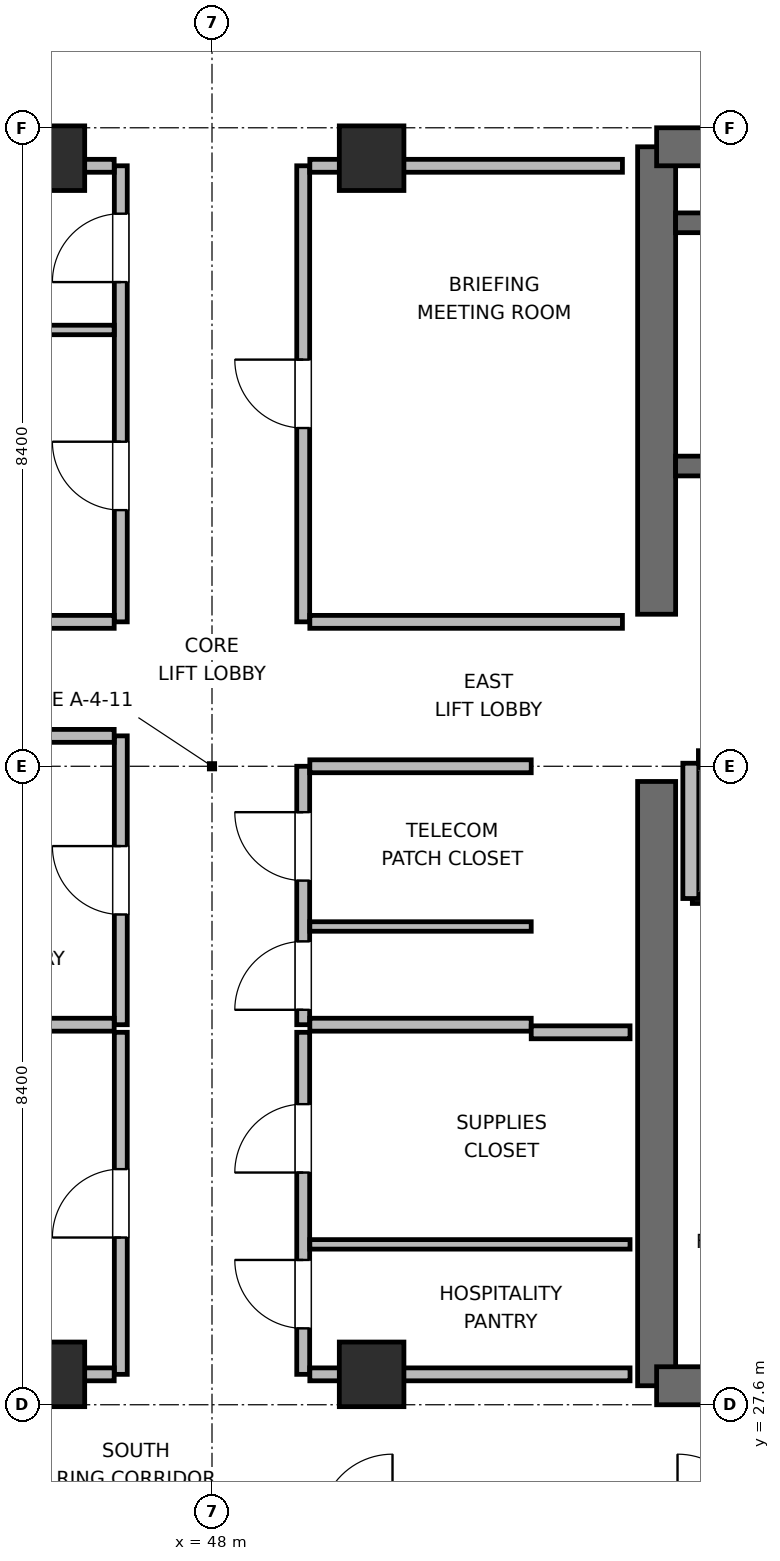
"""IFC4 building model, lengths in metres.
Left out: names, types, materials, properties, quantities, classifications, styles, units other than length and angle.
Written with IfcOpenShell. Run it as: python <this file> out.ifc"""

import sys

from ifc_helpers import new_model, si_unit, direction, frame, frame_2d, origin, origin_2d, place, context, subcontext, project, spatial, rectangle, extrude, element, fill, save


model = new_model("IFC4")
c1 = context("Model", 3, precision=1e-05, world=origin(), true_north=direction((0.0, 1.0)))
c2 = subcontext(c1, "Body", "Model", "MODEL_VIEW")
j1 = project(units=[si_unit("LENGTHUNIT", "METRE"), si_unit("PLANEANGLEUNIT", "RADIAN")], contexts=[c1])
p1 = place(None, origin())
s1 = spatial("IfcSite", under=j1, at=p1, CompositionType="ELEMENT")
p2 = place(p1, origin())
s2 = spatial("IfcBuilding", under=s1, at=p2, CompositionType="ELEMENT")
p3 = place(p2, frame((0.0, 0.0, 314.1)))
s3 = spatial("IfcBuildingStorey", under=s2, at=p3, CompositionType="ELEMENT", Elevation=314.1)
p4 = place(p3, frame((53.85, 27.85, 0.0), z_axis=(0.0, 0.0, 1.0), x_axis=(0.0, 1.0, 0.0)))
e1 = element("IfcWall", 1, at=p4, inside=s3, PredefinedType="SHEAR", context=c2, shape_type="SweptSolid", body=[
    extrude(rectangle(XDim=7.95, YDim=0.5, at=frame_2d((3.975, 0.0))), origin(), (0.0, 0.0, 1.0), 3.9),
])
p5 = place(p3, frame((53.85, 38.0, 0.0), z_axis=(0.0, 0.0, 1.0), x_axis=(0.0, 1.0, 0.0)))
e2 = element("IfcWall", 2, at=p5, inside=s3, PredefinedType="SHEAR", context=c2, shape_type="SweptSolid", body=[
    extrude(rectangle(XDim=6.15, YDim=0.5, at=frame_2d((3.075, 0.0))), origin(), (0.0, 0.0, 1.0), 3.9),
])
p6 = place(p3, frame((53.85, 27.85, 0.0), z_axis=(0.0, 0.0, 1.0), x_axis=(1.0, 0.0, 0.0)))
e3 = element("IfcWall", 3, at=p6, inside=s3, PredefinedType="SHEAR", context=c2, shape_type="SweptSolid", body=[
    extrude(rectangle(XDim=9.5, YDim=0.5, at=frame_2d((4.75, 0.0))), origin(), (0.0, 0.0, 1.0), 3.9),
])
p7 = place(p6, frame((4.025, 0.0, 0.0)))
e4 = element("IfcOpeningElement", 4, at=p7, cuts=e3, PredefinedType="OPENING", context=c2, shape_type="SweptSolid", body=[
    extrude(rectangle(XDim=1.05, YDim=2.04, at=frame_2d((0.525, 1.02))), frame((0.0, 0.26, 0.0), z_axis=(0.0, -1.0, 0.0), x_axis=(1.0, 0.0, 0.0)), (0.0, 0.0, 1.0), 0.52),
])
p8 = place(p3, frame((53.85, 44.15, 0.0), z_axis=(0.0, 0.0, 1.0), x_axis=(1.0, 0.0, 0.0)))
e5 = element("IfcWall", 5, at=p8, inside=s3, PredefinedType="SHEAR", context=c2, shape_type="SweptSolid", body=[
    extrude(rectangle(XDim=9.5, YDim=0.5, at=frame_2d((4.75, 0.0))), origin(), (0.0, 0.0, 1.0), 3.9),
])
p9 = place(p3, frame((54.1, 39.95, 0.0), z_axis=(0.0, 0.0, 1.0), x_axis=(1.0, 0.0, 0.0)))
e6 = element("IfcWall", 6, at=p9, inside=s3, PredefinedType="SHEAR", context=c2, shape_type="SweptSolid", body=[
    extrude(rectangle(XDim=9.0, YDim=0.26, at=frame_2d((4.5, 0.0))), origin(), (0.0, 0.0, 1.0), 3.9),
])
p10 = place(p9, frame((1.1, 0.0, 0.0)))
e7 = element("IfcOpeningElement", 7, at=p10, cuts=e6, PredefinedType="OPENING", context=c2, shape_type="SweptSolid", body=[
    extrude(rectangle(XDim=1.0, YDim=2.04, at=frame_2d((0.5, 1.02))), frame((0.0, 0.14, 0.0), z_axis=(0.0, -1.0, 0.0), x_axis=(1.0, 0.0, 0.0)), (0.0, 0.0, 1.0), 0.28),
])
p11 = place(p3, frame((54.1, 43.15, 0.0), z_axis=(0.0, 0.0, 1.0), x_axis=(1.0, 0.0, 0.0)))
e8 = element("IfcWall", 8, at=p11, inside=s3, PredefinedType="SHEAR", context=c2, shape_type="SweptSolid", body=[
    extrude(rectangle(XDim=9.0, YDim=0.26, at=frame_2d((4.5, 0.0))), origin(), (0.0, 0.0, 1.0), 3.9),
])
for number, where, z_axis, x_axis in (
    (9, (45.9, 28.0, 0.0), (0.0, 0.0, 1.0), (1.0, 0.0, 0.0)),
    (10, (50.1, 28.0, 0.0), (0.0, 0.0, 1.0), (1.0, 0.0, 0.0)),
    (11, (45.9, 44.0, 0.0), (0.0, 0.0, 1.0), (1.0, 0.0, 0.0)),
    (12, (50.1, 44.0, 0.0), (0.0, 0.0, 1.0), (1.0, 0.0, 0.0)),
):
    element("IfcColumn", number, at=place(p3, frame(where, z_axis=z_axis, x_axis=x_axis)), inside=s3, PredefinedType="COLUMN", context=c2, shape_type="SweptSolid", body=[
        extrude(rectangle(XDim=0.85, YDim=0.85, at=origin_2d()), origin(), (0.0, 0.0, 1.0), 3.9),
    ])
p12 = place(p3, frame((54.32, 34.3, 0.0), z_axis=(0.0, 0.0, 1.0), x_axis=(1.0, 0.0, 0.0)))
e13 = element("IfcWall", 13, at=p12, inside=s3, PredefinedType="PARTITIONING", context=c2, shape_type="SweptSolid", body=[
    extrude(rectangle(XDim=3.48, YDim=0.21, at=frame_2d((1.74, 0.0))), origin(), (0.0, 0.0, 1.0), 3.68),
])
p13 = place(p3, frame((54.4, 36.1, 0.0), z_axis=(0.0, 0.0, 1.0), x_axis=(1.0, 0.0, 0.0)))
e14 = element("IfcWall", 14, at=p13, inside=s3, PredefinedType="PARTITIONING", context=c2, shape_type="SweptSolid", body=[
    extrude(rectangle(XDim=2.1, YDim=0.21, at=frame_2d((1.05, 0.0))), origin(), (0.0, 0.0, 1.0), 3.68),
])
p14 = place(p13, frame((0.5, 0.0, 0.0)))
e15 = element("IfcOpeningElement", 15, at=p14, cuts=e14, PredefinedType="OPENING", context=c2, shape_type="SweptSolid", body=[
    extrude(rectangle(XDim=1.1, YDim=2.04, at=frame_2d((0.55, 1.02))), frame((0.0, 0.115, 0.0), z_axis=(0.0, -1.0, 0.0), x_axis=(1.0, 0.0, 0.0)), (0.0, 0.0, 1.0), 0.23),
])
p15 = place(p3, frame((54.3, 34.26, 0.0), z_axis=(0.0, 0.0, 1.0), x_axis=(0.0, 1.0, 0.0)))
e16 = element("IfcWall", 16, at=p15, inside=s3, PredefinedType="PARTITIONING", context=c2, shape_type="SweptSolid", body=[
    extrude(rectangle(XDim=1.78, YDim=0.21, at=frame_2d((0.89, 0.0))), origin(), (0.0, 0.0, 1.0), 3.68),
])
p16 = place(p3, frame((46.8, 32.6, 0.0), z_axis=(0.0, 0.0, 1.0), x_axis=(0.0, 1.0, 0.0)))
e17 = element("IfcWall", 17, at=p16, inside=s3, PredefinedType="PARTITIONING", context=c2, shape_type="SweptSolid", body=[
    extrude(rectangle(XDim=3.8, YDim=0.17, at=frame_2d((1.9, 0.0))), origin(), (0.0, 0.0, 1.0), 3.68),
])
p17 = place(p16, frame((1.45, 0.0, 0.0)))
e18 = element("IfcOpeningElement", 18, at=p17, cuts=e17, PredefinedType="OPENING", context=c2, shape_type="SweptSolid", body=[
    extrude(rectangle(XDim=0.9, YDim=2.02, at=frame_2d((0.45, 1.01))), frame((0.0, 0.095, 0.0), z_axis=(0.0, -1.0, 0.0), x_axis=(1.0, 0.0, 0.0)), (0.0, 0.0, 1.0), 0.19),
])
for number, where, z_axis, x_axis in (
    (19, (43.8, 32.6, 0.0), (0.0, 0.0, 1.0), (1.0, 0.0, 0.0)),
    (20, (43.8, 36.4, 0.0), (0.0, 0.0, 1.0), (1.0, 0.0, 0.0)),
):
    element("IfcWall", number, at=place(p3, frame(where, z_axis=z_axis, x_axis=x_axis)), inside=s3, PredefinedType="PARTITIONING", context=c2, shape_type="SweptSolid", body=[
        extrude(rectangle(XDim=2.913, YDim=0.17, at=frame_2d((1.457, 0.0))), origin(), (0.0, 0.0, 1.0), 3.68),
    ])
p18 = place(p3, frame((49.2, 32.6, 0.0), z_axis=(0.0, 0.0, 1.0), x_axis=(0.0, 1.0, 0.0)))
e21 = element("IfcWall", 21, at=p18, inside=s3, PredefinedType="PARTITIONING", context=c2, shape_type="SweptSolid", body=[
    extrude(rectangle(XDim=3.4, YDim=0.17, at=frame_2d((1.7, 0.0))), origin(), (0.0, 0.0, 1.0), 3.68),
])
p19 = place(p18, frame((0.196, 0.0, 0.0)))
e22 = element("IfcOpeningElement", 22, at=p19, cuts=e21, PredefinedType="OPENING", context=c2, shape_type="SweptSolid", body=[
    extrude(rectangle(XDim=0.9, YDim=2.02, at=frame_2d((0.45, 1.01))), frame((0.0, 0.095, 0.0), z_axis=(0.0, -1.0, 0.0), x_axis=(1.0, 0.0, 0.0)), (0.0, 0.0, 1.0), 0.19),
])
p20 = place(p18, frame((1.896, 0.0, 0.0)))
e23 = element("IfcOpeningElement", 23, at=p20, cuts=e21, PredefinedType="OPENING", context=c2, shape_type="SweptSolid", body=[
    extrude(rectangle(XDim=0.9, YDim=2.02, at=frame_2d((0.45, 1.01))), frame((0.0, 0.095, 0.0), z_axis=(0.0, -1.0, 0.0), x_axis=(1.0, 0.0, 0.0)), (0.0, 0.0, 1.0), 0.19),
])
for number, where, z_axis, x_axis in (
    (24, (49.287, 32.6, 0.0), (0.0, 0.0, 1.0), (1.0, 0.0, 0.0)),
    (25, (49.287, 36.0, 0.0), (0.0, 0.0, 1.0), (1.0, 0.0, 0.0)),
):
    element("IfcWall", number, at=place(p3, frame(where, z_axis=z_axis, x_axis=x_axis)), inside=s3, PredefinedType="PARTITIONING", context=c2, shape_type="SweptSolid", body=[
        extrude(rectangle(XDim=2.913, YDim=0.17, at=frame_2d((1.457, 0.0))), origin(), (0.0, 0.0, 1.0), 3.68),
    ])
p21 = place(p3, frame((49.287, 33.892, 0.0), z_axis=(0.0, 0.0, 1.0), x_axis=(1.0, 0.0, 0.0)))
e26 = element("IfcWall", 26, at=p21, inside=s3, PredefinedType="PARTITIONING", context=c2, shape_type="SweptSolid", body=[
    extrude(rectangle(XDim=2.913, YDim=0.125, at=frame_2d((1.457, 0.0))), origin(), (0.0, 0.0, 1.0), 3.68),
])
p22 = place(p3, frame((46.8, 28.0, 0.0), z_axis=(0.0, 0.0, 1.0), x_axis=(0.0, 1.0, 0.0)))
e27 = element("IfcWall", 27, at=p22, inside=s3, PredefinedType="PARTITIONING", context=c2, shape_type="SweptSolid", body=[
    extrude(rectangle(XDim=4.5, YDim=0.17, at=frame_2d((2.25, 0.0))), origin(), (0.0, 0.0, 1.0), 3.68),
])
p23 = place(p22, frame((1.8, 0.0, 0.0)))
e28 = element("IfcOpeningElement", 28, at=p23, cuts=e27, PredefinedType="OPENING", context=c2, shape_type="SweptSolid", body=[
    extrude(rectangle(XDim=0.9, YDim=2.02, at=frame_2d((0.45, 1.01))), frame((0.0, 0.095, 0.0), z_axis=(0.0, -1.0, 0.0), x_axis=(1.0, 0.0, 0.0)), (0.0, 0.0, 1.0), 0.19),
])
p24 = place(p3, frame((42.5, 28.0, 0.0), z_axis=(0.0, 0.0, 1.0), x_axis=(1.0, 0.0, 0.0)))
e29 = element("IfcWall", 29, at=p24, inside=s3, PredefinedType="PARTITIONING", context=c2, shape_type="SweptSolid", body=[
    extrude(rectangle(XDim=4.213, YDim=0.17, at=frame_2d((2.106, 0.0))), origin(), (0.0, 0.0, 1.0), 2.765),
])
p25 = place(p3, frame((49.2, 28.0, 0.0), z_axis=(0.0, 0.0, 1.0), x_axis=(0.0, 1.0, 0.0)))
e30 = element("IfcWall", 30, at=p25, inside=s3, PredefinedType="PARTITIONING", context=c2, shape_type="SweptSolid", body=[
    extrude(rectangle(XDim=4.5, YDim=0.17, at=frame_2d((2.25, 0.0))), origin(), (0.0, 0.0, 1.0), 3.68),
])
p26 = place(p25, frame((0.605, 0.0, 0.0)))
e31 = element("IfcOpeningElement", 31, at=p26, cuts=e30, PredefinedType="OPENING", context=c2, shape_type="SweptSolid", body=[
    extrude(rectangle(XDim=0.9, YDim=2.02, at=frame_2d((0.45, 1.01))), frame((0.0, 0.095, 0.0), z_axis=(0.0, -1.0, 0.0), x_axis=(1.0, 0.0, 0.0)), (0.0, 0.0, 1.0), 0.19),
])
p27 = place(p25, frame((2.655, 0.0, 0.0)))
e32 = element("IfcOpeningElement", 32, at=p27, cuts=e30, PredefinedType="OPENING", context=c2, shape_type="SweptSolid", body=[
    extrude(rectangle(XDim=0.9, YDim=2.02, at=frame_2d((0.45, 1.01))), frame((0.0, 0.095, 0.0), z_axis=(0.0, -1.0, 0.0), x_axis=(1.0, 0.0, 0.0)), (0.0, 0.0, 1.0), 0.19),
])
p28 = place(p3, frame((49.287, 28.0, 0.0), z_axis=(0.0, 0.0, 1.0), x_axis=(1.0, 0.0, 0.0)))
e33 = element("IfcWall", 33, at=p28, inside=s3, PredefinedType="PARTITIONING", context=c2, shape_type="SweptSolid", body=[
    extrude(rectangle(XDim=4.213, YDim=0.17, at=frame_2d((2.106, 0.0))), origin(), (0.0, 0.0, 1.0), 2.765),
])
p29 = place(p3, frame((52.2, 32.5, 0.0), z_axis=(0.0, 0.0, 1.0), x_axis=(1.0, 0.0, 0.0)))
e34 = element("IfcWall", 34, at=p29, inside=s3, PredefinedType="PARTITIONING", context=c2, shape_type="SweptSolid", body=[
    extrude(rectangle(XDim=1.3, YDim=0.17, at=frame_2d((0.65, 0.0))), origin(), (0.0, 0.0, 1.0), 3.68),
])
p30 = place(p3, frame((49.287, 29.71, 0.0), z_axis=(0.0, 0.0, 1.0), x_axis=(1.0, 0.0, 0.0)))
e35 = element("IfcWall", 35, at=p30, inside=s3, PredefinedType="PARTITIONING", context=c2, shape_type="SweptSolid", body=[
    extrude(rectangle(XDim=4.213, YDim=0.125, at=frame_2d((2.106, 0.0))), origin(), (0.0, 0.0, 1.0), 3.68),
])
p31 = place(p3, frame((46.8, 37.9, 0.0), z_axis=(0.0, 0.0, 1.0), x_axis=(0.0, 1.0, 0.0)))
e36 = element("IfcWall", 36, at=p31, inside=s3, PredefinedType="PARTITIONING", context=c2, shape_type="SweptSolid", body=[
    extrude(rectangle(XDim=6.0, YDim=0.17, at=frame_2d((3.0, 0.0))), origin(), (0.0, 0.0, 1.0), 3.68),
])
p32 = place(p31, frame((1.47, 0.0, 0.0)))
e37 = element("IfcOpeningElement", 37, at=p32, cuts=e36, PredefinedType="OPENING", context=c2, shape_type="SweptSolid", body=[
    extrude(rectangle(XDim=0.9, YDim=2.02, at=frame_2d((0.45, 1.01))), frame((0.0, 0.095, 0.0), z_axis=(0.0, -1.0, 0.0), x_axis=(1.0, 0.0, 0.0)), (0.0, 0.0, 1.0), 0.19),
])
p33 = place(p31, frame((4.47, 0.0, 0.0)))
e38 = element("IfcOpeningElement", 38, at=p33, cuts=e36, PredefinedType="OPENING", context=c2, shape_type="SweptSolid", body=[
    extrude(rectangle(XDim=0.9, YDim=2.02, at=frame_2d((0.45, 1.01))), frame((0.0, 0.095, 0.0), z_axis=(0.0, -1.0, 0.0), x_axis=(1.0, 0.0, 0.0)), (0.0, 0.0, 1.0), 0.19),
])
p34 = place(p3, frame((42.5, 37.9, 0.0), z_axis=(0.0, 0.0, 1.0), x_axis=(1.0, 0.0, 0.0)))
e39 = element("IfcWall", 39, at=p34, inside=s3, PredefinedType="PARTITIONING", context=c2, shape_type="SweptSolid", body=[
    extrude(rectangle(XDim=4.213, YDim=0.17, at=frame_2d((2.106, 0.0))), origin(), (0.0, 0.0, 1.0), 3.68),
])
p35 = place(p3, frame((42.5, 43.9, 0.0), z_axis=(0.0, 0.0, 1.0), x_axis=(1.0, 0.0, 0.0)))
e40 = element("IfcWall", 40, at=p35, inside=s3, PredefinedType="PARTITIONING", context=c2, shape_type="SweptSolid", body=[
    extrude(rectangle(XDim=4.213, YDim=0.17, at=frame_2d((2.106, 0.0))), origin(), (0.0, 0.0, 1.0), 2.765),
])
p36 = place(p3, frame((42.5, 41.74, 0.0), z_axis=(0.0, 0.0, 1.0), x_axis=(1.0, 0.0, 0.0)))
e41 = element("IfcWall", 41, at=p36, inside=s3, PredefinedType="PARTITIONING", context=c2, shape_type="SweptSolid", body=[
    extrude(rectangle(XDim=4.213, YDim=0.125, at=frame_2d((2.106, 0.0))), origin(), (0.0, 0.0, 1.0), 3.68),
])
p37 = place(p3, frame((49.2, 37.9, 0.0), z_axis=(0.0, 0.0, 1.0), x_axis=(0.0, 1.0, 0.0)))
e42 = element("IfcWall", 42, at=p37, inside=s3, PredefinedType="PARTITIONING", context=c2, shape_type="SweptSolid", body=[
    extrude(rectangle(XDim=6.0, YDim=0.17, at=frame_2d((3.0, 0.0))), origin(), (0.0, 0.0, 1.0), 3.68),
])
p38 = place(p37, frame((2.55, 0.0, 0.0)))
e43 = element("IfcOpeningElement", 43, at=p38, cuts=e42, PredefinedType="OPENING", context=c2, shape_type="SweptSolid", body=[
    extrude(rectangle(XDim=0.9, YDim=2.02, at=frame_2d((0.45, 1.01))), frame((0.0, 0.095, 0.0), z_axis=(0.0, -1.0, 0.0), x_axis=(1.0, 0.0, 0.0)), (0.0, 0.0, 1.0), 0.19),
])
p39 = place(p3, frame((49.287, 37.9, 0.0), z_axis=(0.0, 0.0, 1.0), x_axis=(1.0, 0.0, 0.0)))
e44 = element("IfcWall", 44, at=p39, inside=s3, PredefinedType="PARTITIONING", context=c2, shape_type="SweptSolid", body=[
    extrude(rectangle(XDim=4.113, YDim=0.17, at=frame_2d((2.056, 0.0))), origin(), (0.0, 0.0, 1.0), 3.68),
])
p40 = place(p3, frame((49.287, 43.9, 0.0), z_axis=(0.0, 0.0, 1.0), x_axis=(1.0, 0.0, 0.0)))
e45 = element("IfcWall", 45, at=p40, inside=s3, PredefinedType="PARTITIONING", context=c2, shape_type="SweptSolid", body=[
    extrude(rectangle(XDim=4.113, YDim=0.17, at=frame_2d((2.056, 0.0))), origin(), (0.0, 0.0, 1.0), 2.765),
])
p41 = place(p17, origin())
e46 = element("IfcDoor", 46, at=p41, inside=s3, OperationType="SINGLE_SWING_RIGHT", PredefinedType="DOOR", context=c2, shape_type="SweptSolid", body=[
    extrude(rectangle(XDim=0.9, YDim=2.02, at=frame_2d((0.45, 1.01))), frame((0.0, 0.025, 0.0), z_axis=(0.0, -1.0, 0.0), x_axis=(1.0, 0.0, 0.0)), (0.0, 0.0, 1.0), 0.05),
])
fill(e18, e46)
p42 = place(p19, origin())
e47 = element("IfcDoor", 47, at=p42, inside=s3, OperationType="SINGLE_SWING_LEFT", PredefinedType="DOOR", context=c2, shape_type="SweptSolid", body=[
    extrude(rectangle(XDim=0.9, YDim=2.02, at=frame_2d((0.45, 1.01))), frame((0.0, 0.025, 0.0), z_axis=(0.0, -1.0, 0.0), x_axis=(1.0, 0.0, 0.0)), (0.0, 0.0, 1.0), 0.05),
])
fill(e22, e47)
p43 = place(p20, origin())
e48 = element("IfcDoor", 48, at=p43, inside=s3, OperationType="SINGLE_SWING_RIGHT", PredefinedType="DOOR", context=c2, shape_type="SweptSolid", body=[
    extrude(rectangle(XDim=0.9, YDim=2.02, at=frame_2d((0.45, 1.01))), frame((0.0, 0.025, 0.0), z_axis=(0.0, -1.0, 0.0), x_axis=(1.0, 0.0, 0.0)), (0.0, 0.0, 1.0), 0.05),
])
fill(e23, e48)
p44 = place(p23, origin())
e49 = element("IfcDoor", 49, at=p44, inside=s3, OperationType="SINGLE_SWING_LEFT", PredefinedType="DOOR", context=c2, shape_type="SweptSolid", body=[
    extrude(rectangle(XDim=0.9, YDim=2.02, at=frame_2d((0.45, 1.01))), frame((0.0, 0.025, 0.0), z_axis=(0.0, -1.0, 0.0), x_axis=(1.0, 0.0, 0.0)), (0.0, 0.0, 1.0), 0.05),
])
fill(e28, e49)
p45 = place(p26, origin())
e50 = element("IfcDoor", 50, at=p45, inside=s3, OperationType="SINGLE_SWING_RIGHT", PredefinedType="DOOR", context=c2, shape_type="SweptSolid", body=[
    extrude(rectangle(XDim=0.9, YDim=2.02, at=frame_2d((0.45, 1.01))), frame((0.0, 0.025, 0.0), z_axis=(0.0, -1.0, 0.0), x_axis=(1.0, 0.0, 0.0)), (0.0, 0.0, 1.0), 0.05),
])
fill(e31, e50)
p46 = place(p27, origin())
e51 = element("IfcDoor", 51, at=p46, inside=s3, OperationType="SINGLE_SWING_LEFT", PredefinedType="DOOR", context=c2, shape_type="SweptSolid", body=[
    extrude(rectangle(XDim=0.9, YDim=2.02, at=frame_2d((0.45, 1.01))), frame((0.0, 0.025, 0.0), z_axis=(0.0, -1.0, 0.0), x_axis=(1.0, 0.0, 0.0)), (0.0, 0.0, 1.0), 0.05),
])
fill(e32, e51)
p47 = place(p32, origin())
e52 = element("IfcDoor", 52, at=p47, inside=s3, OperationType="SINGLE_SWING_RIGHT", PredefinedType="DOOR", context=c2, shape_type="SweptSolid", body=[
    extrude(rectangle(XDim=0.9, YDim=2.02, at=frame_2d((0.45, 1.01))), frame((0.0, 0.025, 0.0), z_axis=(0.0, -1.0, 0.0), x_axis=(1.0, 0.0, 0.0)), (0.0, 0.0, 1.0), 0.05),
])
fill(e37, e52)
p48 = place(p33, origin())
e53 = element("IfcDoor", 53, at=p48, inside=s3, OperationType="SINGLE_SWING_LEFT", PredefinedType="DOOR", context=c2, shape_type="SweptSolid", body=[
    extrude(rectangle(XDim=0.9, YDim=2.02, at=frame_2d((0.45, 1.01))), frame((0.0, 0.025, 0.0), z_axis=(0.0, -1.0, 0.0), x_axis=(1.0, 0.0, 0.0)), (0.0, 0.0, 1.0), 0.05),
])
fill(e38, e53)
p49 = place(p38, origin())
e54 = element("IfcDoor", 54, at=p49, inside=s3, OperationType="SINGLE_SWING_RIGHT", PredefinedType="DOOR", context=c2, shape_type="SweptSolid", body=[
    extrude(rectangle(XDim=0.9, YDim=2.02, at=frame_2d((0.45, 1.01))), frame((0.0, 0.025, 0.0), z_axis=(0.0, -1.0, 0.0), x_axis=(1.0, 0.0, 0.0)), (0.0, 0.0, 1.0), 0.05),
])
fill(e43, e54)
save(model, sys.argv[1])
